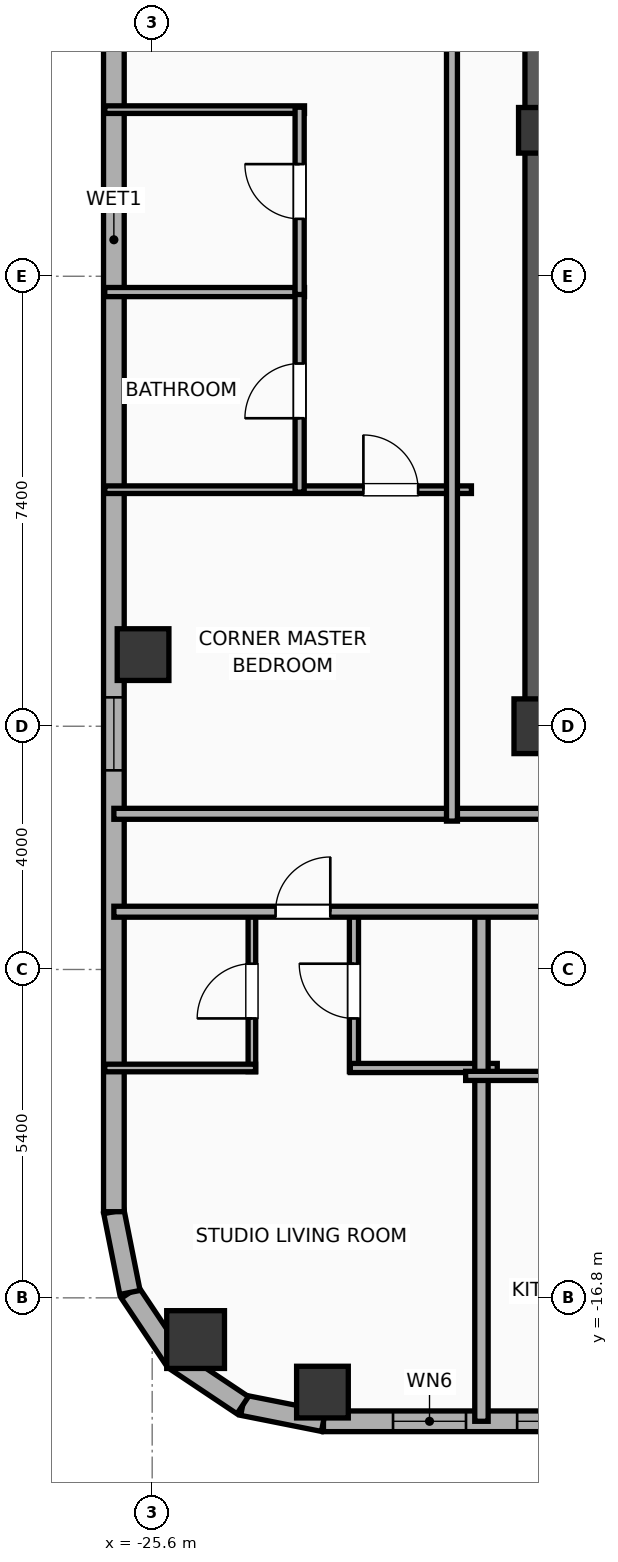
"""IFC4 building model, lengths in metres.
Left out: names, types, materials, properties, quantities, classifications, styles, units other than length and angle.
Written with IfcOpenShell. Run it as: python <this file> out.ifc"""

import sys

from ifc_helpers import new_model, si_unit, direction, frame, frame_2d, origin, origin_2d, place, context, subcontext, project, spatial, rectangle, hollow_rectangle, hollow_circle, extrude, element, fill, save


model = new_model("IFC4")
c1 = context("Model", 3, precision=1e-05, world=origin(), true_north=direction((0.0, 1.0)))
c2 = subcontext(c1, "Body", "Model", "MODEL_VIEW")
j1 = project(units=[si_unit("LENGTHUNIT", "METRE"), si_unit("PLANEANGLEUNIT", "RADIAN")], contexts=[c1])
p1 = place(None, origin())
s1 = spatial("IfcSite", under=j1, at=p1, CompositionType="ELEMENT")
p2 = place(p1, origin())
s2 = spatial("IfcBuilding", under=s1, at=p2, CompositionType="ELEMENT")
p3 = place(p2, frame((0.0, 0.0, 250.9)))
s3 = spatial("IfcBuildingStorey", under=s2, at=p3, CompositionType="ELEMENT", Elevation=250.9)
p4 = place(p3, frame((-19.2, -7.4, 0.0), z_axis=(0.0, 0.0, 1.0), x_axis=(1.0, 0.0, 0.0)))
e1 = element("IfcColumn", 1, at=p4, inside=s3, PredefinedType="COLUMN", context=c2, shape_type="SweptSolid", body=[
    extrude(rectangle(XDim=0.9, YDim=0.9, at=origin_2d()), origin(), (0.0, 0.0, 1.0), 3.9),
])
p5 = place(p3, frame((-19.2, 2.4, 0.0), z_axis=(0.0, 0.0, 1.0), x_axis=(1.0, 0.0, 0.0)))
e2 = element("IfcColumn", 2, at=p5, inside=s3, PredefinedType="COLUMN", context=c2, shape_type="SweptSolid", body=[
    extrude(rectangle(XDim=0.75, YDim=0.75, at=origin_2d()), origin(), (0.0, 0.0, 1.0), 3.9),
])
p6 = place(p3, frame((-19.425, -7.4, 0.0), z_axis=(0.0, 0.0, 1.0), x_axis=(1.0, 0.0, 0.0)))
e3 = element("IfcWall", 3, at=p6, inside=s3, PredefinedType="SHEAR", context=c2, shape_type="SweptSolid", body=[
    extrude(rectangle(XDim=7.25, YDim=0.45, at=frame_2d((3.625, 0.0))), origin(), (0.0, 0.0, 1.0), 3.5),
])
p7 = place(p3, frame((-19.145, -7.4, 0.0), z_axis=(0.0, 0.0, 1.0), x_axis=(0.0, 1.0, 0.0)))
e4 = element("IfcWall", 4, at=p7, inside=s3, PredefinedType="SHEAR", context=c2, shape_type="SweptSolid", body=[
    extrude(rectangle(XDim=14.8, YDim=0.65, at=frame_2d((7.4, 0.0))), origin(), (0.0, 0.0, 1.0), 3.5),
])
for number, where, z_axis, x_axis in (
    (5, (-22.8, -18.35, 0.0), (0.0, 0.0, 1.0), (1.0, 0.0, 0.0)),
    (6, (-25.75, -6.222, 0.0), (0.0, 0.0, 1.0), (1.0, 0.0, 0.0)),
):
    element("IfcColumn", number, at=place(p3, frame(where, z_axis=z_axis, x_axis=x_axis)), inside=s3, PredefinedType="COLUMN", context=c2, shape_type="SweptSolid", body=[
        extrude(hollow_rectangle(XDim=0.85, YDim=0.85, WallThickness=0.028, at=origin_2d()), origin(), (0.0, 0.0, 1.0), 3.865),
    ])
p8 = place(p3, frame((-24.886, -17.486, 0.0), z_axis=(0.0, 0.0, 1.0), x_axis=(1.0, 0.0, 0.0)))
e7 = element("IfcColumn", 7, at=p8, inside=s3, PredefinedType="COLUMN", context=c2, shape_type="SweptSolid", body=[
    extrude(hollow_circle(Radius=0.475, WallThickness=0.032, at=origin_2d()), origin(), (0.0, 0.0, 1.0), 3.865),
])
p9 = place(p3, frame((26.783, -18.83, 0.0), z_axis=(0.0, 0.0, 1.0), x_axis=(-1.0, 0.0, 0.0)))
e8 = element("IfcWall", 8, at=p9, inside=s3, PredefinedType="ELEMENTEDWALL", context=c2, shape_type="SweptSolid", body=[
    extrude(rectangle(XDim=49.566, YDim=0.34, at=frame_2d((24.783, 0.0))), origin(), (0.0, 0.0, 1.0), 2.39),
])
p10 = place(p9, frame((23.583, 0.0, 0.75)))
e9 = element("IfcOpeningElement", 9, at=p10, cuts=e8, PredefinedType="OPENING", context=c2, shape_type="SweptSolid", body=[
    extrude(rectangle(XDim=2.4, YDim=1.45, at=frame_2d((1.2, 0.725))), frame((0.0, 0.18, 0.0), z_axis=(0.0, -1.0, 0.0), x_axis=(1.0, 0.0, 0.0)), (0.0, 0.0, 1.0), 0.36),
])
p11 = place(p9, frame((41.756, 0.0, 0.75)))
e10 = element("IfcOpeningElement", 10, at=p11, cuts=e8, PredefinedType="OPENING", context=c2, shape_type="SweptSolid", body=[
    extrude(rectangle(XDim=2.4, YDim=1.45, at=frame_2d((1.2, 0.725))), frame((0.0, 0.18, 0.0), z_axis=(0.0, -1.0, 0.0), x_axis=(1.0, 0.0, 0.0)), (0.0, 0.0, 1.0), 0.36),
])
p12 = place(p9, frame((47.222, 0.0, 0.55)))
e11 = element("IfcOpeningElement", 11, at=p12, cuts=e8, PredefinedType="OPENING", context=c2, shape_type="SweptSolid", body=[
    extrude(rectangle(XDim=1.2, YDim=1.15, at=frame_2d((0.6, 0.575))), frame((0.0, 0.18, 0.0), z_axis=(0.0, -1.0, 0.0), x_axis=(1.0, 0.0, 0.0)), (0.0, 0.0, 1.0), 0.36),
])
p13 = place(p9, frame((45.181, 0.0, 0.55)))
e12 = element("IfcOpeningElement", 12, at=p13, cuts=e8, PredefinedType="OPENING", context=c2, shape_type="SweptSolid", body=[
    extrude(rectangle(XDim=1.2, YDim=1.15, at=frame_2d((0.6, 0.575))), frame((0.0, 0.18, 0.0), z_axis=(0.0, -1.0, 0.0), x_axis=(1.0, 0.0, 0.0)), (0.0, 0.0, 1.0), 0.36),
])
p14 = place(p9, frame((37.289, 0.0, 0.55)))
e13 = element("IfcOpeningElement", 13, at=p14, cuts=e8, PredefinedType="OPENING", context=c2, shape_type="SweptSolid", body=[
    extrude(rectangle(XDim=1.2, YDim=1.15, at=frame_2d((0.6, 0.575))), frame((0.0, 0.18, 0.0), z_axis=(0.0, -1.0, 0.0), x_axis=(1.0, 0.0, 0.0)), (0.0, 0.0, 1.0), 0.36),
])
p15 = place(p9, frame((16.115, 0.0, 0.55)))
e14 = element("IfcOpeningElement", 14, at=p15, cuts=e8, PredefinedType="OPENING", context=c2, shape_type="SweptSolid", body=[
    extrude(rectangle(XDim=1.2, YDim=1.15, at=frame_2d((0.6, 0.575))), frame((0.0, 0.18, 0.0), z_axis=(0.0, -1.0, 0.0), x_axis=(1.0, 0.0, 0.0)), (0.0, 0.0, 1.0), 0.36),
])
p16 = place(p9, frame((12.422, 0.0, 0.55)))
e15 = element("IfcOpeningElement", 15, at=p16, cuts=e8, PredefinedType="OPENING", context=c2, shape_type="SweptSolid", body=[
    extrude(rectangle(XDim=1.2, YDim=1.15, at=frame_2d((0.6, 0.575))), frame((0.0, 0.18, 0.0), z_axis=(0.0, -1.0, 0.0), x_axis=(1.0, 0.0, 0.0)), (0.0, 0.0, 1.0), 0.36),
])
p17 = place(p9, frame((6.705, 0.0, 0.55)))
e16 = element("IfcOpeningElement", 16, at=p17, cuts=e8, PredefinedType="OPENING", context=c2, shape_type="SweptSolid", body=[
    extrude(rectangle(XDim=0.85, YDim=1.15, at=frame_2d((0.425, 0.575))), frame((0.0, 0.18, 0.0), z_axis=(0.0, -1.0, 0.0), x_axis=(1.0, 0.0, 0.0)), (0.0, 0.0, 1.0), 0.36),
])
p18 = place(p9, frame((4.637, 0.0, 0.55)))
e17 = element("IfcOpeningElement", 17, at=p18, cuts=e8, PredefinedType="OPENING", context=c2, shape_type="SweptSolid", body=[
    extrude(rectangle(XDim=1.2, YDim=1.15, at=frame_2d((0.6, 0.575))), frame((0.0, 0.18, 0.0), z_axis=(0.0, -1.0, 0.0), x_axis=(1.0, 0.0, 0.0)), (0.0, 0.0, 1.0), 0.36),
])
p19 = place(p9, frame((1.811, 0.0, 0.55)))
e18 = element("IfcOpeningElement", 18, at=p19, cuts=e8, PredefinedType="OPENING", context=c2, shape_type="SweptSolid", body=[
    extrude(rectangle(XDim=1.2, YDim=1.15, at=frame_2d((0.6, 0.575))), frame((0.0, 0.18, 0.0), z_axis=(0.0, -1.0, 0.0), x_axis=(1.0, 0.0, 0.0)), (0.0, 0.0, 1.0), 0.36),
])
p20 = place(p9, frame((32.253, 0.0, 0.55)))
e19 = element("IfcOpeningElement", 19, at=p20, cuts=e8, PredefinedType="OPENING", context=c2, shape_type="SweptSolid", body=[
    extrude(rectangle(XDim=1.2, YDim=1.15, at=frame_2d((0.6, 0.575))), frame((0.0, 0.18, 0.0), z_axis=(0.0, -1.0, 0.0), x_axis=(1.0, 0.0, 0.0)), (0.0, 0.0, 1.0), 0.36),
])
p21 = place(p9, frame((27.853, 0.0, 0.55)))
e20 = element("IfcOpeningElement", 20, at=p21, cuts=e8, PredefinedType="OPENING", context=c2, shape_type="SweptSolid", body=[
    extrude(rectangle(XDim=1.2, YDim=1.15, at=frame_2d((0.6, 0.575))), frame((0.0, 0.18, 0.0), z_axis=(0.0, -1.0, 0.0), x_axis=(1.0, 0.0, 0.0)), (0.0, 0.0, 1.0), 0.36),
])
p22 = place(p9, frame((20.473, 0.0, 0.55)))
e21 = element("IfcOpeningElement", 21, at=p22, cuts=e8, PredefinedType="OPENING", context=c2, shape_type="SweptSolid", body=[
    extrude(rectangle(XDim=1.2, YDim=1.15, at=frame_2d((0.6, 0.575))), frame((0.0, 0.18, 0.0), z_axis=(0.0, -1.0, 0.0), x_axis=(1.0, 0.0, 0.0)), (0.0, 0.0, 1.0), 0.36),
])
p23 = place(p3, frame((-22.783, -18.83, 0.0), z_axis=(0.0, 0.0, 1.0), x_axis=(-0.980788153188, 0.195075878998, 0.0)))
e22 = element("IfcWall", 22, at=p23, inside=s3, PredefinedType="ELEMENTEDWALL", context=c2, shape_type="SweptSolid", body=[
    extrude(rectangle(XDim=1.354, YDim=0.34, at=frame_2d((0.677, 0.0))), origin(), (0.0, 0.0, 1.0), 2.39),
])
p24 = place(p3, frame((-24.111, -18.566, 0.0), z_axis=(0.0, 0.0, 1.0), x_axis=(-0.831403586725, 0.555669034571, 0.0)))
e23 = element("IfcWall", 23, at=p24, inside=s3, PredefinedType="ELEMENTEDWALL", context=c2, shape_type="SweptSolid", body=[
    extrude(rectangle(XDim=1.337, YDim=0.34, at=frame_2d((0.668, 0.0))), origin(), (0.0, 0.0, 1.0), 2.39),
])
p25 = place(p3, frame((-25.223, -17.823, 0.0), z_axis=(0.0, 0.0, 1.0), x_axis=(-0.555584683399, 0.831459956686, 0.0)))
e24 = element("IfcWall", 24, at=p25, inside=s3, PredefinedType="ELEMENTEDWALL", context=c2, shape_type="SweptSolid", body=[
    extrude(rectangle(XDim=1.337, YDim=0.34, at=frame_2d((0.668, 0.0))), origin(), (0.0, 0.0, 1.0), 3.5),
])
p26 = place(p3, frame((-25.966, -16.711, 0.0), z_axis=(0.0, 0.0, 1.0), x_axis=(-0.195110379894, 0.98078129043, 0.0)))
e25 = element("IfcWall", 25, at=p26, inside=s3, PredefinedType="ELEMENTEDWALL", context=c2, shape_type="SweptSolid", body=[
    extrude(rectangle(XDim=1.354, YDim=0.34, at=frame_2d((0.677, 0.0))), origin(), (0.0, 0.0, 1.0), 3.5),
])
p27 = place(p3, frame((-26.23, -15.383, 0.0), z_axis=(0.0, 0.0, 1.0), x_axis=(0.0, 1.0, 0.0)))
e26 = element("IfcWall", 26, at=p27, inside=s3, PredefinedType="ELEMENTEDWALL", context=c2, shape_type="SweptSolid", body=[
    extrude(rectangle(XDim=31.967, YDim=0.34, at=frame_2d((15.983, 0.0))), origin(), (0.0, 0.0, 1.0), 2.39),
])
p28 = place(p27, frame((29.431, 0.0, 0.55)))
e27 = element("IfcOpeningElement", 27, at=p28, cuts=e26, PredefinedType="OPENING", context=c2, shape_type="SweptSolid", body=[
    extrude(rectangle(XDim=1.2, YDim=1.15, at=frame_2d((0.6, 0.575))), frame((0.0, 0.18, 0.0), z_axis=(0.0, -1.0, 0.0), x_axis=(1.0, 0.0, 0.0)), (0.0, 0.0, 1.0), 0.36),
])
p29 = place(p27, frame((20.603, 0.0, 0.55)))
e28 = element("IfcOpeningElement", 28, at=p29, cuts=e26, PredefinedType="OPENING", context=c2, shape_type="SweptSolid", body=[
    extrude(rectangle(XDim=1.2, YDim=1.15, at=frame_2d((0.6, 0.575))), frame((0.0, 0.18, 0.0), z_axis=(0.0, -1.0, 0.0), x_axis=(1.0, 0.0, 0.0)), (0.0, 0.0, 1.0), 0.36),
])
p30 = place(p27, frame((7.258, 0.0, 0.55)))
e29 = element("IfcOpeningElement", 29, at=p30, cuts=e26, PredefinedType="OPENING", context=c2, shape_type="SweptSolid", body=[
    extrude(rectangle(XDim=1.2, YDim=1.15, at=frame_2d((0.6, 0.575))), frame((0.0, 0.18, 0.0), z_axis=(0.0, -1.0, 0.0), x_axis=(1.0, 0.0, 0.0)), (0.0, 0.0, 1.0), 0.36),
])
p31 = place(p3, frame((-26.23, -8.84, 0.0), z_axis=(0.0, 0.0, 1.0), x_axis=(1.0, 0.0, 0.0)))
e30 = element("IfcWall", 30, at=p31, inside=s3, PredefinedType="PARTITIONING", context=c2, shape_type="SweptSolid", body=[
    extrude(rectangle(XDim=16.35, YDim=0.18, at=frame_2d((8.175, 0.0))), origin(), (0.0, 0.0, 1.0), 3.5),
])
p32 = place(p3, frame((-23.96, -13.08, 0.0), z_axis=(0.0, 0.0, 1.0), x_axis=(0.0, 1.0, 0.0)))
e31 = element("IfcWall", 31, at=p32, inside=s3, PredefinedType="PARTITIONING", context=c2, shape_type="SweptSolid", body=[
    extrude(rectangle(XDim=2.65, YDim=0.125, at=frame_2d((1.325, 0.0))), origin(), (0.0, 0.0, 1.0), 3.5),
])
p33 = place(p32, frame((0.875, 0.0, 0.0)))
e32 = element("IfcOpeningElement", 32, at=p33, cuts=e31, PredefinedType="OPENING", context=c2, shape_type="SweptSolid", body=[
    extrude(rectangle(XDim=0.9, YDim=2.05, at=frame_2d((0.45, 1.025))), frame((0.0, 0.073, 0.0), z_axis=(0.0, -1.0, 0.0), x_axis=(1.0, 0.0, 0.0)), (0.0, 0.0, 1.0), 0.145),
])
p34 = place(p3, frame((-22.282, -13.08, 0.0), z_axis=(0.0, 0.0, 1.0), x_axis=(0.0, 1.0, 0.0)))
e33 = element("IfcWall", 33, at=p34, inside=s3, PredefinedType="PLUMBINGWALL", context=c2, shape_type="SweptSolid", body=[
    extrude(rectangle(XDim=2.65, YDim=0.15, at=frame_2d((1.325, 0.0))), origin(), (0.0, 0.0, 1.0), 3.5),
])
p35 = place(p34, frame((0.875, 0.0, 0.0)))
e34 = element("IfcOpeningElement", 34, at=p35, cuts=e33, PredefinedType="OPENING", context=c2, shape_type="SweptSolid", body=[
    extrude(rectangle(XDim=0.9, YDim=2.05, at=frame_2d((0.45, 1.025))), frame((0.0, 0.085, 0.0), z_axis=(0.0, -1.0, 0.0), x_axis=(1.0, 0.0, 0.0)), (0.0, 0.0, 1.0), 0.17),
])
p36 = place(p3, frame((-26.38, -13.02, 0.0), z_axis=(0.0, 0.0, 1.0), x_axis=(1.0, 0.0, 0.0)))
e35 = element("IfcWall", 35, at=p36, inside=s3, PredefinedType="PARTITIONING", context=c2, shape_type="SweptSolid", body=[
    extrude(rectangle(XDim=2.48, YDim=0.125, at=frame_2d((1.24, 0.0))), origin(), (0.0, 0.0, 1.0), 3.5),
])
p37 = place(p3, frame((-22.342, -13.02, 0.0), z_axis=(0.0, 0.0, 1.0), x_axis=(1.0, 0.0, 0.0)))
e36 = element("IfcWall", 36, at=p37, inside=s3, PredefinedType="PLUMBINGWALL", context=c2, shape_type="SweptSolid", body=[
    extrude(rectangle(XDim=2.417, YDim=0.15, at=frame_2d((1.208, 0.0))), origin(), (0.0, 0.0, 1.0), 3.5),
])
p38 = place(p3, frame((-20.185, -18.83, 0.0), z_axis=(0.0, 0.0, 1.0), x_axis=(0.0, 1.0, 0.0)))
e37 = element("IfcWall", 37, at=p38, inside=s3, PredefinedType="PARTITIONING", context=c2, shape_type="SweptSolid", body=[
    extrude(rectangle(XDim=8.46, YDim=0.22, at=frame_2d((4.23, 0.0))), origin(), (0.0, 0.0, 1.0), 2.39),
])
p39 = place(p3, frame((-20.445, -13.15, 0.0), z_axis=(0.0, 0.0, 1.0), x_axis=(1.0, 0.0, 0.0)))
e38 = element("IfcWall", 38, at=p39, inside=s3, PredefinedType="PLUMBINGWALL", context=c2, shape_type="SweptSolid", body=[
    extrude(rectangle(XDim=2.714, YDim=0.15, at=frame_2d((1.357, 0.0))), origin(), (0.0, 0.0, 1.0), 3.5),
])
p40 = place(p3, frame((-26.23, -10.45, 0.0), z_axis=(0.0, 0.0, 1.0), x_axis=(1.0, 0.0, 0.0)))
e39 = element("IfcWall", 39, at=p40, inside=s3, PredefinedType="PARTITIONING", context=c2, shape_type="SweptSolid", body=[
    extrude(rectangle(XDim=18.15, YDim=0.18, at=frame_2d((9.075, 0.0))), origin(), (0.0, 0.0, 1.0), 3.5),
])
p41 = place(p40, frame((2.659, 0.0, 0.0)))
e40 = element("IfcOpeningElement", 40, at=p41, cuts=e39, PredefinedType="OPENING", context=c2, shape_type="SweptSolid", body=[
    extrude(rectangle(XDim=0.9, YDim=2.05, at=frame_2d((0.45, 1.025))), frame((0.0, 0.1, 0.0), z_axis=(0.0, -1.0, 0.0), x_axis=(1.0, 0.0, 0.0)), (0.0, 0.0, 1.0), 0.2),
])
p42 = place(p40, frame((9.654, 0.0, 0.0)))
e41 = element("IfcOpeningElement", 41, at=p42, cuts=e39, PredefinedType="OPENING", context=c2, shape_type="SweptSolid", body=[
    extrude(rectangle(XDim=1.15, YDim=2.05, at=frame_2d((0.575, 1.025))), frame((0.0, 0.1, 0.0), z_axis=(0.0, -1.0, 0.0), x_axis=(1.0, 0.0, 0.0)), (0.0, 0.0, 1.0), 0.2),
])
p43 = place(p40, frame((14.792, 0.0, 0.0)))
e42 = element("IfcOpeningElement", 42, at=p43, cuts=e39, PredefinedType="OPENING", context=c2, shape_type="SweptSolid", body=[
    extrude(rectangle(XDim=0.9, YDim=2.05, at=frame_2d((0.45, 1.025))), frame((0.0, 0.1, 0.0), z_axis=(0.0, -1.0, 0.0), x_axis=(1.0, 0.0, 0.0)), (0.0, 0.0, 1.0), 0.2),
])
p44 = place(p3, frame((-26.38, 2.74, 0.0), z_axis=(0.0, 0.0, 1.0), x_axis=(1.0, 0.0, 0.0)))
e43 = element("IfcWall", 43, at=p44, inside=s3, PredefinedType="PARTITIONING", context=c2, shape_type="SweptSolid", body=[
    extrude(rectangle(XDim=3.285, YDim=0.125, at=frame_2d((1.643, 0.0))), origin(), (0.0, 0.0, 1.0), 3.5),
])
p45 = place(p3, frame((-26.38, -0.26, 0.0), z_axis=(0.0, 0.0, 1.0), x_axis=(1.0, 0.0, 0.0)))
e44 = element("IfcWall", 44, at=p45, inside=s3, PredefinedType="PLUMBINGWALL", context=c2, shape_type="SweptSolid", body=[
    extrude(rectangle(XDim=3.285, YDim=0.15, at=frame_2d((1.643, 0.0))), origin(), (0.0, 0.0, 1.0), 3.5),
])
p46 = place(p3, frame((-26.38, -3.51, 0.0), z_axis=(0.0, 0.0, 1.0), x_axis=(1.0, 0.0, 0.0)))
e45 = element("IfcWall", 45, at=p46, inside=s3, PredefinedType="PARTITIONING", context=c2, shape_type="SweptSolid", body=[
    extrude(rectangle(XDim=6.03, YDim=0.125, at=frame_2d((3.015, 0.0))), origin(), (0.0, 0.0, 1.0), 3.5),
])
p47 = place(p46, frame((4.253, 0.0, 0.0)))
e46 = element("IfcOpeningElement", 46, at=p47, cuts=e45, PredefinedType="OPENING", context=c2, shape_type="SweptSolid", body=[
    extrude(rectangle(XDim=0.9, YDim=2.05, at=frame_2d((0.45, 1.025))), frame((0.0, 0.073, 0.0), z_axis=(0.0, -1.0, 0.0), x_axis=(1.0, 0.0, 0.0)), (0.0, 0.0, 1.0), 0.145),
])
p48 = place(p3, frame((-23.175, -3.55, 0.0), z_axis=(0.0, 0.0, 1.0), x_axis=(0.0, 1.0, 0.0)))
e47 = element("IfcWall", 47, at=p48, inside=s3, PredefinedType="PLUMBINGWALL", context=c2, shape_type="SweptSolid", body=[
    extrude(rectangle(XDim=3.33, YDim=0.15, at=frame_2d((1.665, 0.0))), origin(), (0.0, 0.0, 1.0), 3.5),
])
p49 = place(p48, frame((1.215, 0.0, 0.0)))
e48 = element("IfcOpeningElement", 48, at=p49, cuts=e47, PredefinedType="OPENING", context=c2, shape_type="SweptSolid", body=[
    extrude(rectangle(XDim=0.9, YDim=2.05, at=frame_2d((0.45, 1.025))), frame((0.0, 0.085, 0.0), z_axis=(0.0, -1.0, 0.0), x_axis=(1.0, 0.0, 0.0)), (0.0, 0.0, 1.0), 0.17),
])
p50 = place(p3, frame((-23.175, -0.3, 0.0), z_axis=(0.0, 0.0, 1.0), x_axis=(0.0, 1.0, 0.0)))
e49 = element("IfcWall", 49, at=p50, inside=s3, PredefinedType="PLUMBINGWALL", context=c2, shape_type="SweptSolid", body=[
    extrude(rectangle(XDim=3.08, YDim=0.15, at=frame_2d((1.54, 0.0))), origin(), (0.0, 0.0, 1.0), 3.5),
])
p51 = place(p50, frame((1.244, 0.0, 0.0)))
e50 = element("IfcOpeningElement", 50, at=p51, cuts=e49, PredefinedType="OPENING", context=c2, shape_type="SweptSolid", body=[
    extrude(rectangle(XDim=0.9, YDim=2.05, at=frame_2d((0.45, 1.025))), frame((0.0, 0.085, 0.0), z_axis=(0.0, -1.0, 0.0), x_axis=(1.0, 0.0, 0.0)), (0.0, 0.0, 1.0), 0.17),
])
p52 = place(p3, frame((-20.67, -8.96, 0.0), z_axis=(0.0, 0.0, 1.0), x_axis=(0.0, 1.0, 0.0)))
e51 = element("IfcWall", 51, at=p52, inside=s3, PredefinedType="PARTITIONING", context=c2, shape_type="SweptSolid", body=[
    extrude(rectangle(XDim=17.92, YDim=0.18, at=frame_2d((8.96, 0.0))), origin(), (0.0, 0.0, 1.0), 3.5),
])
p53 = place(p12, origin())
e52 = element("IfcWindow", 52, at=p53, inside=s3, PartitioningType="SINGLE_PANEL", PredefinedType="WINDOW", context=c2, shape_type="SweptSolid", body=[
    extrude(rectangle(XDim=1.2, YDim=1.15, at=frame_2d((0.6, 0.575))), frame((0.0, 0.03, 0.0), z_axis=(0.0, -1.0, 0.0), x_axis=(1.0, 0.0, 0.0)), (0.0, 0.0, 1.0), 0.06),
])
fill(e11, e52)
p54 = place(p13, origin())
e53 = element("IfcWindow", 53, at=p54, inside=s3, PartitioningType="SINGLE_PANEL", PredefinedType="WINDOW", context=c2, shape_type="SweptSolid", body=[
    extrude(rectangle(XDim=1.2, YDim=1.15, at=frame_2d((0.6, 0.575))), frame((0.0, 0.03, 0.0), z_axis=(0.0, -1.0, 0.0), x_axis=(1.0, 0.0, 0.0)), (0.0, 0.0, 1.0), 0.06),
])
fill(e12, e53)
p55 = place(p30, origin())
e54 = element("IfcWindow", 54, at=p55, inside=s3, PartitioningType="SINGLE_PANEL", PredefinedType="WINDOW", context=c2, shape_type="SweptSolid", body=[
    extrude(rectangle(XDim=1.2, YDim=1.15, at=frame_2d((0.6, 0.575))), frame((0.0, 0.03, 0.0), z_axis=(0.0, -1.0, 0.0), x_axis=(1.0, 0.0, 0.0)), (0.0, 0.0, 1.0), 0.06),
])
fill(e29, e54)
p56 = place(p33, origin())
e55 = element("IfcDoor", 55, at=p56, inside=s3, OperationType="SINGLE_SWING_LEFT", PredefinedType="DOOR", context=c2, shape_type="SweptSolid", body=[
    extrude(rectangle(XDim=0.9, YDim=2.05, at=frame_2d((0.45, 1.025))), frame((0.0, 0.025, 0.0), z_axis=(0.0, -1.0, 0.0), x_axis=(1.0, 0.0, 0.0)), (0.0, 0.0, 1.0), 0.05),
])
fill(e32, e55)
p57 = place(p35, origin())
e56 = element("IfcDoor", 56, at=p57, inside=s3, OperationType="SINGLE_SWING_RIGHT", PredefinedType="DOOR", context=c2, shape_type="SweptSolid", body=[
    extrude(rectangle(XDim=0.9, YDim=2.05, at=frame_2d((0.45, 1.025))), frame((0.0, 0.025, 0.0), z_axis=(0.0, -1.0, 0.0), x_axis=(1.0, 0.0, 0.0)), (0.0, 0.0, 1.0), 0.05),
])
fill(e34, e56)
p58 = place(p41, origin())
e57 = element("IfcDoor", 57, at=p58, inside=s3, OperationType="SINGLE_SWING_RIGHT", PredefinedType="DOOR", context=c2, shape_type="SweptSolid", body=[
    extrude(rectangle(XDim=0.9, YDim=2.05, at=frame_2d((0.45, 1.025))), frame((0.0, 0.025, 0.0), z_axis=(0.0, -1.0, 0.0), x_axis=(1.0, 0.0, 0.0)), (0.0, 0.0, 1.0), 0.05),
])
fill(e40, e57)
p59 = place(p47, origin())
e58 = element("IfcDoor", 58, at=p59, inside=s3, OperationType="SINGLE_SWING_LEFT", PredefinedType="DOOR", context=c2, shape_type="SweptSolid", body=[
    extrude(rectangle(XDim=0.9, YDim=2.05, at=frame_2d((0.45, 1.025))), frame((0.0, 0.025, 0.0), z_axis=(0.0, -1.0, 0.0), x_axis=(1.0, 0.0, 0.0)), (0.0, 0.0, 1.0), 0.05),
])
fill(e46, e58)
p60 = place(p49, origin())
e59 = element("IfcDoor", 59, at=p60, inside=s3, OperationType="SINGLE_SWING_LEFT", PredefinedType="DOOR", context=c2, shape_type="SweptSolid", body=[
    extrude(rectangle(XDim=0.9, YDim=2.05, at=frame_2d((0.45, 1.025))), frame((0.0, 0.025, 0.0), z_axis=(0.0, -1.0, 0.0), x_axis=(1.0, 0.0, 0.0)), (0.0, 0.0, 1.0), 0.05),
])
fill(e48, e59)
p61 = place(p51, origin())
e60 = element("IfcDoor", 60, at=p61, inside=s3, OperationType="SINGLE_SWING_RIGHT", PredefinedType="DOOR", context=c2, shape_type="SweptSolid", body=[
    extrude(rectangle(XDim=0.9, YDim=2.05, at=frame_2d((0.45, 1.025))), frame((0.0, 0.025, 0.0), z_axis=(0.0, -1.0, 0.0), x_axis=(1.0, 0.0, 0.0)), (0.0, 0.0, 1.0), 0.05),
])
fill(e50, e60)
save(model, sys.argv[1])
